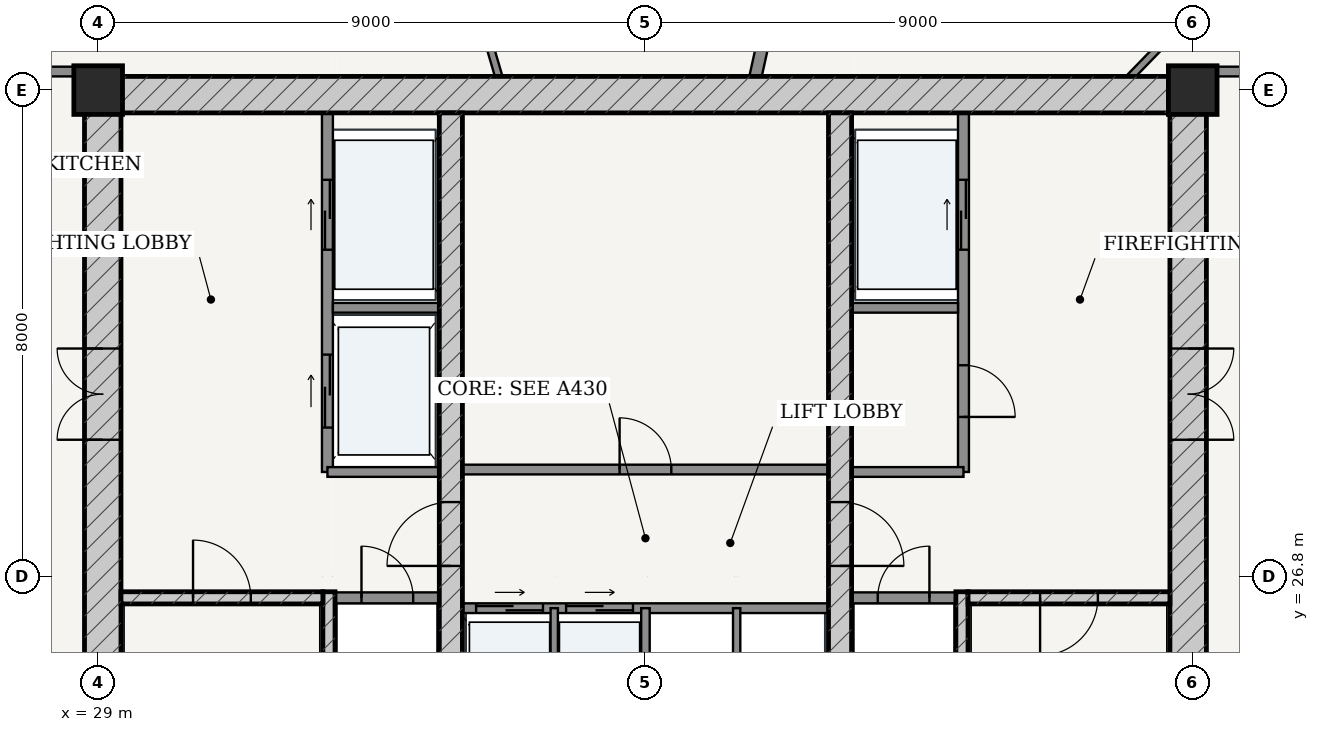
"""IFC4 building model, lengths in metres.
Left out: names, types, materials, properties, quantities, classifications, styles, units other than length and angle.
Written with IfcOpenShell. Run it as: python <this file> out.ifc"""

import sys

from ifc_helpers import new_model, si_unit, direction, frame, frame_2d, origin, origin_2d, place, context, subcontext, project, spatial, rectangle, extrude, source, transform, mapped, element, fill, save


model = new_model("IFC4")
c1 = context("Model", 3, precision=1e-05, world=origin(), true_north=direction((-0.2419218956, 0.970295726276)))
c2 = subcontext(c1, "Body", "Model", "MODEL_VIEW")
j1 = project(units=[si_unit("LENGTHUNIT", "METRE"), si_unit("PLANEANGLEUNIT", "RADIAN")], contexts=[c1])
p1 = place(None, origin())
s1 = spatial("IfcSite", under=j1, at=p1, CompositionType="ELEMENT")
p2 = place(p1, origin())
s2 = spatial("IfcBuilding", under=s1, at=p2, CompositionType="ELEMENT")
p3 = place(p2, frame((0.0, 0.0, 231.9)))
s3 = spatial("IfcBuildingStorey", under=s2, at=p3, CompositionType="ELEMENT", Elevation=231.9)
for number, where, z_axis, x_axis in (
    (1, (47.0, 34.8, 0.0), (0.0, 0.0, 1.0), (1.0, 0.0, 0.0)),
    (2, (29.0, 34.8, 0.0), (0.0, 0.0, 1.0), (1.0, 0.0, 0.0)),
):
    element("IfcColumn", number, at=place(p3, frame(where, z_axis=z_axis, x_axis=x_axis)), inside=s3, PredefinedType="COLUMN", context=c2, shape_type="SweptSolid", body=[
        extrude(rectangle(XDim=0.8, YDim=0.8, at=origin_2d()), origin(), (0.0, 0.0, 1.0), 3.7),
    ])
p4 = place(p3, frame((28.775, 34.725, 0.0), z_axis=(0.0, 0.0, 1.0), x_axis=(1.0, 0.0, 0.0)))
e3 = element("IfcWall", 3, at=p4, inside=s3, PredefinedType="SHEAR", context=c2, shape_type="SweptSolid", body=[
    extrude(rectangle(XDim=18.45, YDim=0.6, at=frame_2d((9.225, 0.0))), origin(), (0.0, 0.0, 1.0), 3.435),
])
p5 = place(p3, frame((29.075, 19.175, 0.0), z_axis=(0.0, 0.0, 1.0), x_axis=(0.0, 1.0, 0.0)))
e4 = element("IfcWall", 4, at=p5, inside=s3, PredefinedType="SHEAR", context=c2, shape_type="SweptSolid", body=[
    extrude(rectangle(XDim=15.25, YDim=0.6, at=frame_2d((7.625, 0.0))), origin(), (0.0, 0.0, 1.0), 3.435),
])
p6 = place(p5, frame((9.875, 0.0, 0.0)))
e5 = element("IfcOpeningElement", 5, at=p6, cuts=e4, PredefinedType="OPENING", context=c2, shape_type="SweptSolid", body=[
    extrude(rectangle(XDim=1.5, YDim=2.2, at=frame_2d((0.75, 1.1))), frame((0.0, 0.31, 0.0), z_axis=(0.0, -1.0, 0.0), x_axis=(1.0, 0.0, 0.0)), (0.0, 0.0, 1.0), 0.62),
])
p7 = place(p3, frame((46.925, 19.175, 0.0), z_axis=(0.0, 0.0, 1.0), x_axis=(0.0, 1.0, 0.0)))
e6 = element("IfcWall", 6, at=p7, inside=s3, PredefinedType="SHEAR", context=c2, shape_type="SweptSolid", body=[
    extrude(rectangle(XDim=15.25, YDim=0.6, at=frame_2d((7.625, 0.0))), origin(), (0.0, 0.0, 1.0), 3.435),
])
p8 = place(p7, frame((9.875, 0.0, 0.0)))
e7 = element("IfcOpeningElement", 7, at=p8, cuts=e6, PredefinedType="OPENING", context=c2, shape_type="SweptSolid", body=[
    extrude(rectangle(XDim=1.5, YDim=2.2, at=frame_2d((0.75, 1.1))), frame((0.0, 0.31, 0.0), z_axis=(0.0, -1.0, 0.0), x_axis=(1.0, 0.0, 0.0)), (0.0, 0.0, 1.0), 0.62),
])
p9 = place(p3, frame((32.795, 19.175, 0.0), z_axis=(0.0, 0.0, 1.0), x_axis=(0.0, 1.0, 0.0)))
e8 = element("IfcWall", 8, at=p9, inside=s3, PredefinedType="SOLIDWALL", context=c2, shape_type="SweptSolid", body=[
    extrude(rectangle(XDim=7.375, YDim=0.2, at=frame_2d((3.688, 0.0))), origin(), (0.0, 0.0, 1.0), 3.435),
])
p10 = place(p3, frame((29.375, 26.45, 0.0), z_axis=(0.0, 0.0, 1.0), x_axis=(1.0, 0.0, 0.0)))
e9 = element("IfcWall", 9, at=p10, inside=s3, PredefinedType="SOLIDWALL", context=c2, shape_type="SweptSolid", body=[
    extrude(rectangle(XDim=3.32, YDim=0.2, at=frame_2d((1.66, 0.0))), origin(), (0.0, 0.0, 1.0), 3.435),
])
p11 = place(p10, frame((1.185, 0.0, 0.0)))
e10 = element("IfcOpeningElement", 10, at=p11, cuts=e9, PredefinedType="OPENING", context=c2, shape_type="SweptSolid", body=[
    extrude(rectangle(XDim=0.95, YDim=2.15, at=frame_2d((0.475, 1.075))), frame((0.0, 0.11, 0.0), z_axis=(0.0, -1.0, 0.0), x_axis=(1.0, 0.0, 0.0)), (0.0, 0.0, 1.0), 0.22),
])
p12 = place(p3, frame((43.205, 19.175, 0.0), z_axis=(0.0, 0.0, 1.0), x_axis=(0.0, 1.0, 0.0)))
e11 = element("IfcWall", 11, at=p12, inside=s3, PredefinedType="SOLIDWALL", context=c2, shape_type="SweptSolid", body=[
    extrude(rectangle(XDim=7.375, YDim=0.2, at=frame_2d((3.688, 0.0))), origin(), (0.0, 0.0, 1.0), 3.435),
])
p13 = place(p3, frame((43.305, 26.45, 0.0), z_axis=(0.0, 0.0, 1.0), x_axis=(1.0, 0.0, 0.0)))
e12 = element("IfcWall", 12, at=p13, inside=s3, PredefinedType="SOLIDWALL", context=c2, shape_type="SweptSolid", body=[
    extrude(rectangle(XDim=3.32, YDim=0.2, at=frame_2d((1.66, 0.0))), origin(), (0.0, 0.0, 1.0), 3.435),
])
p14 = place(p13, frame((1.185, 0.0, 0.0)))
e13 = element("IfcOpeningElement", 13, at=p14, cuts=e12, PredefinedType="OPENING", context=c2, shape_type="SweptSolid", body=[
    extrude(rectangle(XDim=0.95, YDim=2.15, at=frame_2d((0.475, 1.075))), frame((0.0, 0.11, 0.0), z_axis=(0.0, -1.0, 0.0), x_axis=(1.0, 0.0, 0.0)), (0.0, 0.0, 1.0), 0.22),
])
p15 = place(p3, frame((34.8, 19.175, 0.0), z_axis=(0.0, 0.0, 1.0), x_axis=(0.0, 1.0, 0.0)))
e14 = element("IfcWall", 14, at=p15, inside=s3, PredefinedType="SHEAR", context=c2, shape_type="SweptSolid", body=[
    extrude(rectangle(XDim=15.25, YDim=0.38, at=frame_2d((7.625, 0.0))), origin(), (0.0, 0.0, 1.0), 3.435),
])
p16 = place(p15, frame((7.8, 0.0, 0.0)))
e15 = element("IfcOpeningElement", 15, at=p16, cuts=e14, PredefinedType="OPENING", context=c2, shape_type="SweptSolid", body=[
    extrude(rectangle(XDim=1.05, YDim=2.15, at=frame_2d((0.525, 1.075))), frame((0.0, 0.2, 0.0), z_axis=(0.0, -1.0, 0.0), x_axis=(1.0, 0.0, 0.0)), (0.0, 0.0, 1.0), 0.4),
])
p17 = place(p3, frame((41.2, 19.175, 0.0), z_axis=(0.0, 0.0, 1.0), x_axis=(0.0, 1.0, 0.0)))
e16 = element("IfcWall", 16, at=p17, inside=s3, PredefinedType="SHEAR", context=c2, shape_type="SweptSolid", body=[
    extrude(rectangle(XDim=15.25, YDim=0.38, at=frame_2d((7.625, 0.0))), origin(), (0.0, 0.0, 1.0), 3.435),
])
p18 = place(p17, frame((7.8, 0.0, 0.0)))
e17 = element("IfcOpeningElement", 17, at=p18, cuts=e16, PredefinedType="OPENING", context=c2, shape_type="SweptSolid", body=[
    extrude(rectangle(XDim=1.05, YDim=2.15, at=frame_2d((0.525, 1.075))), frame((0.0, 0.2, 0.0), z_axis=(0.0, -1.0, 0.0), x_axis=(1.0, 0.0, 0.0)), (0.0, 0.0, 1.0), 0.4),
])
p19 = place(p3, frame((32.9, 26.45, 0.0), z_axis=(0.0, 0.0, 1.0), x_axis=(1.0, 0.0, 0.0)))
e18 = element("IfcWall", 18, at=p19, inside=s3, PredefinedType="PARTITIONING", context=c2, shape_type="SweptSolid", body=[
    extrude(rectangle(XDim=1.71, YDim=0.18, at=frame_2d((0.855, 0.0))), origin(), (0.0, 0.0, 1.0), 3.435),
])
p20 = place(p19, frame((0.43, 0.0, 0.0)))
e19 = element("IfcOpeningElement", 19, at=p20, cuts=e18, PredefinedType="OPENING", context=c2, shape_type="SweptSolid", body=[
    extrude(rectangle(XDim=0.85, YDim=2.1, at=frame_2d((0.425, 1.05))), frame((0.0, 0.1, 0.0), z_axis=(0.0, -1.0, 0.0), x_axis=(1.0, 0.0, 0.0)), (0.0, 0.0, 1.0), 0.2),
])
p21 = place(p3, frame((41.39, 26.45, 0.0), z_axis=(0.0, 0.0, 1.0), x_axis=(1.0, 0.0, 0.0)))
e20 = element("IfcWall", 20, at=p21, inside=s3, PredefinedType="PARTITIONING", context=c2, shape_type="SweptSolid", body=[
    extrude(rectangle(XDim=1.71, YDim=0.18, at=frame_2d((0.855, 0.0))), origin(), (0.0, 0.0, 1.0), 3.435),
])
p22 = place(p21, frame((0.43, 0.0, 0.0)))
e21 = element("IfcOpeningElement", 21, at=p22, cuts=e20, PredefinedType="OPENING", context=c2, shape_type="SweptSolid", body=[
    extrude(rectangle(XDim=0.85, YDim=2.1, at=frame_2d((0.425, 1.05))), frame((0.0, 0.1, 0.0), z_axis=(0.0, -1.0, 0.0), x_axis=(1.0, 0.0, 0.0)), (0.0, 0.0, 1.0), 0.2),
])
p23 = place(p3, frame((32.77, 28.52, 0.0), z_axis=(0.0, 0.0, 1.0), x_axis=(0.0, 1.0, 0.0)))
e22 = element("IfcWall", 22, at=p23, inside=s3, PredefinedType="PARTITIONING", context=c2, shape_type="SweptSolid", body=[
    extrude(rectangle(XDim=5.905, YDim=0.18, at=frame_2d((2.953, 0.0))), origin(), (0.0, 0.0, 1.0), 3.435),
])
p24 = place(p23, frame((3.655, 0.0, 0.0)))
e23 = element("IfcOpeningElement", 23, at=p24, cuts=e22, PredefinedType="OPENING", context=c2, shape_type="SweptSolid", body=[
    extrude(rectangle(XDim=1.15, YDim=2.2, at=frame_2d((0.575, 1.1))), frame((0.0, 0.1, 0.0), z_axis=(0.0, -1.0, 0.0), x_axis=(1.0, 0.0, 0.0)), (0.0, 0.0, 1.0), 0.2),
])
p25 = place(p23, frame((0.73, 0.0, 0.0)))
e24 = element("IfcOpeningElement", 24, at=p25, cuts=e22, PredefinedType="OPENING", context=c2, shape_type="SweptSolid", body=[
    extrude(rectangle(XDim=1.2, YDim=2.25, at=frame_2d((0.6, 1.125))), frame((0.0, 0.1, 0.0), z_axis=(0.0, -1.0, 0.0), x_axis=(1.0, 0.0, 0.0)), (0.0, 0.0, 1.0), 0.2),
])
p26 = place(p3, frame((32.86, 31.22, 0.0), z_axis=(0.0, 0.0, 1.0), x_axis=(1.0, 0.0, 0.0)))
e25 = element("IfcWall", 25, at=p26, inside=s3, PredefinedType="PARTITIONING", context=c2, shape_type="SweptSolid", body=[
    extrude(rectangle(XDim=1.75, YDim=0.16, at=frame_2d((0.875, 0.0))), origin(), (0.0, 0.0, 1.0), 3.435),
])
p27 = place(p3, frame((32.77, 28.52, 0.0), z_axis=(0.0, 0.0, 1.0), x_axis=(1.0, 0.0, 0.0)))
e26 = element("IfcWall", 26, at=p27, inside=s3, PredefinedType="PARTITIONING", context=c2, shape_type="SweptSolid", body=[
    extrude(rectangle(XDim=1.84, YDim=0.16, at=frame_2d((0.92, 0.0))), origin(), (0.0, 0.0, 1.0), 3.435),
])
p28 = place(p3, frame((43.23, 28.52, 0.0), z_axis=(0.0, 0.0, 1.0), x_axis=(0.0, 1.0, 0.0)))
e27 = element("IfcWall", 27, at=p28, inside=s3, PredefinedType="PARTITIONING", context=c2, shape_type="SweptSolid", body=[
    extrude(rectangle(XDim=5.905, YDim=0.18, at=frame_2d((2.953, 0.0))), origin(), (0.0, 0.0, 1.0), 3.435),
])
p29 = place(p28, frame((0.905, 0.0, 0.0)))
e28 = element("IfcOpeningElement", 28, at=p29, cuts=e27, PredefinedType="OPENING", context=c2, shape_type="SweptSolid", body=[
    extrude(rectangle(XDim=0.85, YDim=2.1, at=frame_2d((0.425, 1.05))), frame((0.0, 0.1, 0.0), z_axis=(0.0, -1.0, 0.0), x_axis=(1.0, 0.0, 0.0)), (0.0, 0.0, 1.0), 0.2),
])
p30 = place(p28, frame((3.655, 0.0, 0.0)))
e29 = element("IfcOpeningElement", 29, at=p30, cuts=e27, PredefinedType="OPENING", context=c2, shape_type="SweptSolid", body=[
    extrude(rectangle(XDim=1.15, YDim=2.2, at=frame_2d((0.575, 1.1))), frame((0.0, 0.1, 0.0), z_axis=(0.0, -1.0, 0.0), x_axis=(1.0, 0.0, 0.0)), (0.0, 0.0, 1.0), 0.2),
])
p31 = place(p3, frame((41.39, 31.22, 0.0), z_axis=(0.0, 0.0, 1.0), x_axis=(1.0, 0.0, 0.0)))
e30 = element("IfcWall", 30, at=p31, inside=s3, PredefinedType="PARTITIONING", context=c2, shape_type="SweptSolid", body=[
    extrude(rectangle(XDim=1.75, YDim=0.16, at=frame_2d((0.875, 0.0))), origin(), (0.0, 0.0, 1.0), 3.435),
])
p32 = place(p3, frame((41.39, 28.52, 0.0), z_axis=(0.0, 0.0, 1.0), x_axis=(1.0, 0.0, 0.0)))
e31 = element("IfcWall", 31, at=p32, inside=s3, PredefinedType="PARTITIONING", context=c2, shape_type="SweptSolid", body=[
    extrude(rectangle(XDim=1.84, YDim=0.16, at=frame_2d((0.92, 0.0))), origin(), (0.0, 0.0, 1.0), 3.435),
])
p33 = place(p3, frame((34.99, 28.56, 0.0), z_axis=(0.0, 0.0, 1.0), x_axis=(1.0, 0.0, 0.0)))
e32 = element("IfcWall", 32, at=p33, inside=s3, PredefinedType="PARTITIONING", context=c2, shape_type="SweptSolid", body=[
    extrude(rectangle(XDim=6.02, YDim=0.16, at=frame_2d((3.01, 0.0))), origin(), (0.0, 0.0, 1.0), 3.435),
])
p34 = place(p33, frame((2.585, 0.0, 0.0)))
e33 = element("IfcOpeningElement", 33, at=p34, cuts=e32, PredefinedType="OPENING", context=c2, shape_type="SweptSolid", body=[
    extrude(rectangle(XDim=0.85, YDim=2.1, at=frame_2d((0.425, 1.05))), frame((0.0, 0.09, 0.0), z_axis=(0.0, -1.0, 0.0), x_axis=(1.0, 0.0, 0.0)), (0.0, 0.0, 1.0), 0.18),
])
p35 = place(p3, frame((34.99, 26.28, 0.0), z_axis=(0.0, 0.0, 1.0), x_axis=(1.0, 0.0, 0.0)))
e34 = element("IfcWall", 34, at=p35, inside=s3, PredefinedType="PARTITIONING", context=c2, shape_type="SweptSolid", body=[
    extrude(rectangle(XDim=6.02, YDim=0.16, at=frame_2d((3.01, 0.0))), origin(), (0.0, 0.0, 1.0), 3.435),
])
p36 = place(p35, frame((0.225, 0.0, 0.0)))
e35 = element("IfcOpeningElement", 35, at=p36, cuts=e34, PredefinedType="OPENING", context=c2, shape_type="SweptSolid", body=[
    extrude(rectangle(XDim=1.1, YDim=2.2, at=frame_2d((0.55, 1.1))), frame((0.0, 0.09, 0.0), z_axis=(0.0, -1.0, 0.0), x_axis=(1.0, 0.0, 0.0)), (0.0, 0.0, 1.0), 0.18),
])
p37 = place(p35, frame((1.705, 0.0, 0.0)))
e36 = element("IfcOpeningElement", 36, at=p37, cuts=e34, PredefinedType="OPENING", context=c2, shape_type="SweptSolid", body=[
    extrude(rectangle(XDim=1.1, YDim=2.2, at=frame_2d((0.55, 1.1))), frame((0.0, 0.09, 0.0), z_axis=(0.0, -1.0, 0.0), x_axis=(1.0, 0.0, 0.0)), (0.0, 0.0, 1.0), 0.18),
])
p38 = place(p3, frame((36.5, 23.72, 0.0), z_axis=(0.0, 0.0, 1.0), x_axis=(0.0, 1.0, 0.0)))
e37 = element("IfcWall", 37, at=p38, inside=s3, PredefinedType="PARTITIONING", context=c2, shape_type="SweptSolid", body=[
    extrude(rectangle(XDim=2.56, YDim=0.12, at=frame_2d((1.28, 0.0))), origin(), (0.0, 0.0, 1.0), 3.435),
])
p39 = place(p3, frame((38.0, 23.72, 0.0), z_axis=(0.0, 0.0, 1.0), x_axis=(0.0, 1.0, 0.0)))
e38 = element("IfcWall", 38, at=p39, inside=s3, PredefinedType="PARTITIONING", context=c2, shape_type="SweptSolid", body=[
    extrude(rectangle(XDim=2.56, YDim=0.14, at=frame_2d((1.28, 0.0))), origin(), (0.0, 0.0, 1.0), 3.435),
])
p40 = place(p3, frame((39.5, 23.72, 0.0), z_axis=(0.0, 0.0, 1.0), x_axis=(0.0, 1.0, 0.0)))
e39 = element("IfcWall", 39, at=p40, inside=s3, PredefinedType="PARTITIONING", context=c2, shape_type="SweptSolid", body=[
    extrude(rectangle(XDim=2.56, YDim=0.12, at=frame_2d((1.28, 0.0))), origin(), (0.0, 0.0, 1.0), 3.435),
])
p41 = place(p3, frame((26.845, 35.105, 0.0), z_axis=(0.0, 0.0, 1.0), x_axis=(1.0, 0.0, 0.0)))
e40 = element("IfcWall", 40, at=p41, inside=s3, PredefinedType="PARTITIONING", context=c2, shape_type="SweptSolid", body=[
    extrude(rectangle(XDim=1.93, YDim=0.16, at=frame_2d((0.965, 0.0))), origin(), (0.0, 0.0, 1.0), 3.435),
])
p42 = place(p41, frame((0.37, 0.0, 0.0)))
e41 = element("IfcOpeningElement", 41, at=p42, cuts=e40, PredefinedType="OPENING", context=c2, shape_type="SweptSolid", body=[
    extrude(rectangle(XDim=0.98, YDim=2.2, at=frame_2d((0.49, 1.1))), frame((0.0, 0.09, 0.0), z_axis=(0.0, -1.0, 0.0), x_axis=(1.0, 0.0, 0.0)), (0.0, 0.0, 1.0), 0.18),
])
p43 = place(p3, frame((47.225, 35.105, 0.0), z_axis=(0.0, 0.0, 1.0), x_axis=(1.0, 0.0, 0.0)))
e42 = element("IfcWall", 42, at=p43, inside=s3, PredefinedType="PARTITIONING", context=c2, shape_type="SweptSolid", body=[
    extrude(rectangle(XDim=1.93, YDim=0.16, at=frame_2d((0.965, 0.0))), origin(), (0.0, 0.0, 1.0), 3.435),
])
p44 = place(p3, frame((39.811, 35.027, 0.0), z_axis=(0.0, 0.0, 1.0), x_axis=(0.214966857327, 0.976621344356, 0.0)))
e43 = element("IfcWall", 43, at=p44, inside=s3, PredefinedType="PARTITIONING", context=c2, shape_type="SweptSolid", body=[
    extrude(rectangle(XDim=11.258, YDim=0.2, at=frame_2d((5.629, 0.0))), origin(), (0.0, 0.0, 1.0), 2.52),
])
p45 = place(p3, frame((35.586, 35.027, 0.0), z_axis=(0.0, 0.0, 1.0), x_axis=(-0.281539118681, 0.959549751004, 0.0)))
e44 = element("IfcWall", 44, at=p45, inside=s3, PredefinedType="PARTITIONING", context=c2, shape_type="SweptSolid", body=[
    extrude(rectangle(XDim=2.698, YDim=0.12, at=frame_2d((1.349, 0.0))), origin(), (0.0, 0.0, 1.0), 2.52),
])
p46 = place(p45, frame((0.919, 0.0, 0.0)))
e45 = element("IfcOpeningElement", 45, at=p46, cuts=e44, PredefinedType="OPENING", context=c2, shape_type="SweptSolid", body=[
    extrude(rectangle(XDim=0.86, YDim=2.15, at=frame_2d((0.43, 1.075))), frame((0.0, 0.07, 0.0), z_axis=(0.0, -1.0, 0.0), x_axis=(1.0, 0.0, 0.0)), (0.0, 0.0, 1.0), 0.14),
])
p47 = place(p3, frame((45.983, 35.026, 0.0), z_axis=(0.0, 0.0, 1.0), x_axis=(0.696410097703, 0.717644045344, 0.0)))
e46 = element("IfcWall", 46, at=p47, inside=s3, PredefinedType="PARTITIONING", context=c2, shape_type="SweptSolid", body=[
    extrude(rectangle(XDim=3.852, YDim=0.12, at=frame_2d((1.926, 0.0))), origin(), (0.0, 0.0, 1.0), 2.951),
])
p48 = place(p47, frame((1.496, 0.0, 0.0)))
e47 = element("IfcOpeningElement", 47, at=p48, cuts=e46, PredefinedType="OPENING", context=c2, shape_type="SweptSolid", body=[
    extrude(rectangle(XDim=0.86, YDim=2.15, at=frame_2d((0.43, 1.075))), frame((0.0, 0.07, 0.0), z_axis=(0.0, -1.0, 0.0), x_axis=(1.0, 0.0, 0.0)), (0.0, 0.0, 1.0), 0.14),
])
m1 = source(origin(), c2, "Body", "SweptSolid", [
    extrude(rectangle(XDim=1.5, YDim=2.2, at=frame_2d((0.75, 1.1))), frame((0.0, 0.025, 0.0), z_axis=(0.0, -1.0, 0.0), x_axis=(1.0, 0.0, 0.0)), (0.0, 0.0, 1.0), 0.05),
])
p49 = place(p6, origin())
e48 = element("IfcDoor", 48, at=p49, inside=s3, OperationType="DOUBLE_DOOR_SINGLE_SWING", PredefinedType="DOOR", context=c2, shape_type="MappedRepresentation", body=[
    mapped(m1, transform((0.0, 0.0, 0.0), scale=1.0)),
])
fill(e5, e48)
p50 = place(p8, frame((1.5, 0.0, 0.0), z_axis=(0.0, 0.0, 1.0), x_axis=(-1.0, 0.0, 0.0)))
e49 = element("IfcDoor", 49, at=p50, inside=s3, OperationType="DOUBLE_DOOR_SINGLE_SWING", PredefinedType="DOOR", context=c2, shape_type="MappedRepresentation", body=[
    mapped(m1, transform((0.0, 0.0, 0.0), scale=1.0)),
])
fill(e7, e49)
m2 = source(origin(), c2, "Body", "SweptSolid", [
    extrude(rectangle(XDim=1.05, YDim=2.15, at=frame_2d((0.525, 1.075))), frame((0.0, 0.025, 0.0), z_axis=(0.0, -1.0, 0.0), x_axis=(1.0, 0.0, 0.0)), (0.0, 0.0, 1.0), 0.05),
])
p51 = place(p16, origin())
e50 = element("IfcDoor", 50, at=p51, inside=s3, OperationType="SINGLE_SWING_LEFT", PredefinedType="DOOR", context=c2, shape_type="MappedRepresentation", body=[
    mapped(m2, transform((0.0, 0.0, 0.0), scale=1.0)),
])
fill(e15, e50)
p52 = place(p18, frame((1.05, 0.0, 0.0), z_axis=(0.0, 0.0, 1.0), x_axis=(-1.0, 0.0, 0.0)))
e51 = element("IfcDoor", 51, at=p52, inside=s3, OperationType="SINGLE_SWING_RIGHT", PredefinedType="DOOR", context=c2, shape_type="MappedRepresentation", body=[
    mapped(m2, transform((0.0, 0.0, 0.0), scale=1.0)),
])
fill(e17, e51)
m3 = source(origin(), c2, "Body", "SweptSolid", [
    extrude(rectangle(XDim=0.95, YDim=2.15, at=frame_2d((0.475, 1.075))), frame((0.0, 0.025, 0.0), z_axis=(0.0, -1.0, 0.0), x_axis=(1.0, 0.0, 0.0)), (0.0, 0.0, 1.0), 0.05),
])
p53 = place(p11, origin())
e52 = element("IfcDoor", 52, at=p53, inside=s3, OperationType="SINGLE_SWING_LEFT", PredefinedType="DOOR", context=c2, shape_type="MappedRepresentation", body=[
    mapped(m3, transform((0.0, 0.0, 0.0), scale=1.0)),
])
fill(e10, e52)
p54 = place(p14, frame((0.95, 0.0, 0.0), z_axis=(0.0, 0.0, 1.0), x_axis=(-1.0, 0.0, 0.0)))
e53 = element("IfcDoor", 53, at=p54, inside=s3, OperationType="SINGLE_SWING_RIGHT", PredefinedType="DOOR", context=c2, shape_type="MappedRepresentation", body=[
    mapped(m3, transform((0.0, 0.0, 0.0), scale=1.0)),
])
fill(e13, e53)
m4 = source(origin(), c2, "Body", "SweptSolid", [
    extrude(rectangle(XDim=0.85, YDim=2.1, at=frame_2d((0.425, 1.05))), frame((0.0, 0.025, 0.0), z_axis=(0.0, -1.0, 0.0), x_axis=(1.0, 0.0, 0.0)), (0.0, 0.0, 1.0), 0.05),
])
p55 = place(p20, origin())
e54 = element("IfcDoor", 54, at=p55, inside=s3, OperationType="SINGLE_SWING_LEFT", PredefinedType="DOOR", context=c2, shape_type="MappedRepresentation", body=[
    mapped(m4, transform((0.0, 0.0, 0.0), scale=1.0)),
])
fill(e19, e54)
p56 = place(p22, origin())
e55 = element("IfcDoor", 55, at=p56, inside=s3, OperationType="SINGLE_SWING_RIGHT", PredefinedType="DOOR", context=c2, shape_type="MappedRepresentation", body=[
    mapped(m4, transform((0.0, 0.0, 0.0), scale=1.0)),
])
fill(e21, e55)
p57 = place(p29, frame((0.85, 0.0, 0.0), z_axis=(0.0, 0.0, 1.0), x_axis=(-1.0, 0.0, 0.0)))
e56 = element("IfcDoor", 56, at=p57, inside=s3, OperationType="SINGLE_SWING_RIGHT", PredefinedType="DOOR", context=c2, shape_type="MappedRepresentation", body=[
    mapped(m4, transform((0.0, 0.0, 0.0), scale=1.0)),
])
fill(e28, e56)
p58 = place(p34, origin())
e57 = element("IfcDoor", 57, at=p58, inside=s3, OperationType="SINGLE_SWING_LEFT", PredefinedType="DOOR", context=c2, shape_type="MappedRepresentation", body=[
    mapped(m4, transform((0.0, 0.0, 0.0), scale=1.0)),
])
fill(e33, e57)
m5 = source(origin(), c2, "Body", "SweptSolid", [
    extrude(rectangle(XDim=1.15, YDim=2.2, at=frame_2d((0.575, 1.1))), frame((0.0, 0.025, 0.0), z_axis=(0.0, -1.0, 0.0), x_axis=(1.0, 0.0, 0.0)), (0.0, 0.0, 1.0), 0.05),
])
p59 = place(p24, origin())
e58 = element("IfcDoor", 58, at=p59, inside=s3, OperationType="DOUBLE_DOOR_SLIDING", PredefinedType="DOOR", context=c2, shape_type="MappedRepresentation", body=[
    mapped(m5, transform((0.0, 0.0, 0.0), scale=1.0)),
])
fill(e23, e58)
p60 = place(p30, origin())
e59 = element("IfcDoor", 59, at=p60, inside=s3, OperationType="DOUBLE_DOOR_SLIDING", PredefinedType="DOOR", context=c2, shape_type="MappedRepresentation", body=[
    mapped(m5, transform((0.0, 0.0, 0.0), scale=1.0)),
])
fill(e29, e59)
m6 = source(origin(), c2, "Body", "SweptSolid", [
    extrude(rectangle(XDim=1.2, YDim=2.25, at=frame_2d((0.6, 1.125))), frame((0.0, 0.025, 0.0), z_axis=(0.0, -1.0, 0.0), x_axis=(1.0, 0.0, 0.0)), (0.0, 0.0, 1.0), 0.05),
])
p61 = place(p25, origin())
e60 = element("IfcDoor", 60, at=p61, inside=s3, OperationType="DOUBLE_DOOR_SLIDING", PredefinedType="DOOR", context=c2, shape_type="MappedRepresentation", body=[
    mapped(m6, transform((0.0, 0.0, 0.0), scale=1.0)),
])
fill(e24, e60)
m7 = source(origin(), c2, "Body", "SweptSolid", [
    extrude(rectangle(XDim=1.1, YDim=2.2, at=frame_2d((0.55, 1.1))), frame((0.0, 0.025, 0.0), z_axis=(0.0, -1.0, 0.0), x_axis=(1.0, 0.0, 0.0)), (0.0, 0.0, 1.0), 0.05),
])
p62 = place(p36, origin())
e61 = element("IfcDoor", 61, at=p62, inside=s3, OperationType="DOUBLE_DOOR_SLIDING", PredefinedType="DOOR", context=c2, shape_type="MappedRepresentation", body=[
    mapped(m7, transform((0.0, 0.0, 0.0), scale=1.0)),
])
fill(e35, e61)
p63 = place(p37, origin())
e62 = element("IfcDoor", 62, at=p63, inside=s3, OperationType="DOUBLE_DOOR_SLIDING", PredefinedType="DOOR", context=c2, shape_type="MappedRepresentation", body=[
    mapped(m7, transform((0.0, 0.0, 0.0), scale=1.0)),
])
fill(e36, e62)
save(model, sys.argv[1])
